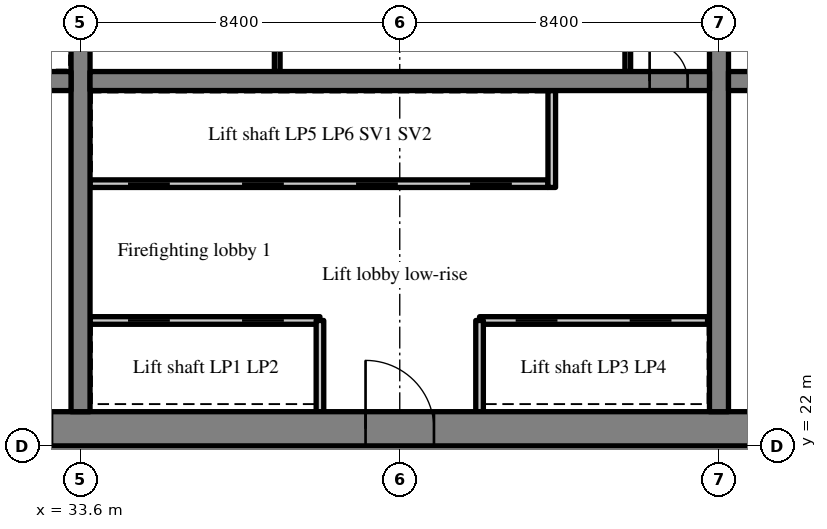
"""IFC4 building model, lengths in metres.
Left out: names, types, materials, properties, quantities, classifications, styles, units other than length and angle.
Written with IfcOpenShell. Run it as: python <this file> out.ifc"""

import sys

from ifc_helpers import new_model, si_unit, direction, frame, frame_2d, origin, place, context, subcontext, project, spatial, rectangle, extrude, source, transform, mapped, element, fill, save


model = new_model("IFC4")
c1 = context("Model", 3, precision=1e-05, world=origin(), true_north=direction((0.0, 1.0)))
c2 = subcontext(c1, "Body", "Model", "MODEL_VIEW")
j1 = project(units=[si_unit("LENGTHUNIT", "METRE"), si_unit("PLANEANGLEUNIT", "RADIAN")], contexts=[c1])
p1 = place(None, origin())
s1 = spatial("IfcSite", under=j1, at=p1, CompositionType="ELEMENT")
p2 = place(p1, origin())
s2 = spatial("IfcBuilding", under=s1, at=p2, CompositionType="ELEMENT")
p3 = place(p2, frame((0.0, 0.0, 86.4)))
s3 = spatial("IfcBuildingStorey", under=s2, at=p3, CompositionType="ELEMENT", Elevation=86.4)
m1 = source(origin(), c2, "Body", "SweptSolid", [
    extrude(rectangle(XDim=50.4, YDim=0.9, at=frame_2d((25.2, 0.0))), origin(), (0.0, 0.0, 1.0), 4.72),
])
p4 = place(p3, frame((25.2, 22.45, 0.0), z_axis=(0.0, 0.0, 1.0), x_axis=(1.0, 0.0, 0.0)))
e1 = element("IfcWall", 1, at=p4, inside=s3, PredefinedType="SHEAR", context=c2, shape_type="MappedRepresentation", body=[
    mapped(m1, transform((0.0, 0.0, 0.0), scale=1.0)),
])
m2 = source(origin(), c2, "Body", "SweptSolid", [
    extrude(rectangle(XDim=1.8, YDim=2.1, at=frame_2d((0.9, 1.05))), frame((0.0, 0.46, 0.0), z_axis=(0.0, -1.0, 0.0), x_axis=(1.0, 0.0, 0.0)), (0.0, 0.0, 1.0), 0.92),
])
p5 = place(p4, frame((15.9, 0.0, 0.0)))
e2 = element("IfcOpeningElement", 2, at=p5, cuts=e1, PredefinedType="OPENING", context=c2, shape_type="MappedRepresentation", body=[
    mapped(m2, transform((0.0, 0.0, 0.0), scale=1.0)),
])
m3 = source(origin(), c2, "Body", "SweptSolid", [
    extrude(rectangle(XDim=1.2, YDim=2.1, at=frame_2d((0.6, 1.05))), frame((0.0, 0.46, 0.0), z_axis=(0.0, -1.0, 0.0), x_axis=(1.0, 0.0, 0.0)), (0.0, 0.0, 1.0), 0.92),
])
p6 = place(p4, frame((26.975, 0.0, 0.0)))
e3 = element("IfcOpeningElement", 3, at=p6, cuts=e1, PredefinedType="OPENING", context=c2, shape_type="MappedRepresentation", body=[
    mapped(m3, transform((0.0, 0.0, 0.0), scale=1.0)),
])
m4 = source(origin(), c2, "Body", "SweptSolid", [
    extrude(rectangle(XDim=0.9, YDim=2.1, at=frame_2d((0.45, 1.05))), frame((0.0, 0.46, 0.0), z_axis=(0.0, -1.0, 0.0), x_axis=(1.0, 0.0, 0.0)), (0.0, 0.0, 1.0), 0.92),
])
p7 = place(p4, frame((34.5, 0.0, 0.0)))
e4 = element("IfcOpeningElement", 4, at=p7, cuts=e1, PredefinedType="OPENING", context=c2, shape_type="MappedRepresentation", body=[
    mapped(m4, transform((0.0, 0.0, 0.0), scale=1.0)),
])
p8 = place(p4, frame((31.5, 0.0, 0.0)))
e5 = element("IfcOpeningElement", 5, at=p8, cuts=e1, PredefinedType="OPENING", context=c2, shape_type="MappedRepresentation", body=[
    mapped(m4, transform((0.0, 0.0, 0.0), scale=1.0)),
])
p9 = place(p4, frame((39.788, 0.0, 0.0)))
e6 = element("IfcOpeningElement", 6, at=p9, cuts=e1, PredefinedType="OPENING", context=c2, shape_type="MappedRepresentation", body=[
    mapped(m4, transform((0.0, 0.0, 0.0), scale=1.0)),
])
p10 = place(p4, frame((36.762, 0.0, 0.0)))
e7 = element("IfcOpeningElement", 7, at=p10, cuts=e1, PredefinedType="OPENING", context=c2, shape_type="MappedRepresentation", body=[
    mapped(m4, transform((0.0, 0.0, 0.0), scale=1.0)),
])
p11 = place(p4, frame((6.45, 0.0, 0.0)))
e8 = element("IfcOpeningElement", 8, at=p11, cuts=e1, PredefinedType="OPENING", context=c2, shape_type="MappedRepresentation", body=[
    mapped(m3, transform((0.0, 0.0, 0.0), scale=1.0)),
])
p12 = place(p4, frame((47.775, 0.0, 0.0)))
e9 = element("IfcOpeningElement", 9, at=p12, cuts=e1, PredefinedType="OPENING", context=c2, shape_type="MappedRepresentation", body=[
    mapped(m3, transform((0.0, 0.0, 0.0), scale=1.0)),
])
m5 = source(origin(), c2, "Body", "SweptSolid", [
    extrude(rectangle(XDim=18.2, YDim=0.5, at=frame_2d((9.1, 0.0))), origin(), (0.0, 0.0, 1.0), 4.72),
])
p13 = place(p3, frame((33.6, 22.9, 0.0), z_axis=(0.0, 0.0, 1.0), x_axis=(0.0, 1.0, 0.0)))
e10 = element("IfcWall", 10, at=p13, inside=s3, PredefinedType="SHEAR", context=c2, shape_type="MappedRepresentation", body=[
    mapped(m5, transform((0.0, 0.0, 0.0), scale=1.0)),
])
m6 = source(origin(), c2, "Body", "SweptSolid", [
    extrude(rectangle(XDim=1.1, YDim=2.1, at=frame_2d((0.55, 1.05))), frame((0.0, 0.26, 0.0), z_axis=(0.0, -1.0, 0.0), x_axis=(1.0, 0.0, 0.0)), (0.0, 0.0, 1.0), 0.52),
])
p14 = place(p13, frame((12.55, 0.0, 0.0)))
e11 = element("IfcOpeningElement", 11, at=p14, cuts=e10, PredefinedType="OPENING", context=c2, shape_type="MappedRepresentation", body=[
    mapped(m6, transform((0.0, 0.0, 0.0), scale=1.0)),
])
p15 = place(p3, frame((50.4, 22.9, 0.0), z_axis=(0.0, 0.0, 1.0), x_axis=(0.0, 1.0, 0.0)))
e12 = element("IfcWall", 12, at=p15, inside=s3, PredefinedType="SHEAR", context=c2, shape_type="MappedRepresentation", body=[
    mapped(m5, transform((0.0, 0.0, 0.0), scale=1.0)),
])
p16 = place(p15, frame((12.55, 0.0, 0.0)))
e13 = element("IfcOpeningElement", 13, at=p16, cuts=e12, PredefinedType="OPENING", context=c2, shape_type="MappedRepresentation", body=[
    mapped(m6, transform((0.0, 0.0, 0.0), scale=1.0)),
])
m7 = source(origin(), c2, "Body", "SweptSolid", [
    extrude(rectangle(XDim=7.25, YDim=0.5, at=frame_2d((3.625, 0.0))), origin(), (0.0, 0.0, 1.0), 4.72),
])
p17 = place(p3, frame((26.1, 31.6, 0.0), z_axis=(0.0, 0.0, 1.0), x_axis=(1.0, 0.0, 0.0)))
e14 = element("IfcWall", 14, at=p17, inside=s3, PredefinedType="SHEAR", context=c2, shape_type="MappedRepresentation", body=[
    mapped(m7, transform((0.0, 0.0, 0.0), scale=1.0)),
])
p18 = place(p17, frame((5.6, 0.0, 0.0)))
e15 = element("IfcOpeningElement", 15, at=p18, cuts=e14, PredefinedType="OPENING", context=c2, shape_type="MappedRepresentation", body=[
    mapped(m6, transform((0.0, 0.0, 0.0), scale=1.0)),
])
m8 = source(origin(), c2, "Body", "SweptSolid", [
    extrude(rectangle(XDim=16.3, YDim=0.5, at=frame_2d((8.15, 0.0))), origin(), (0.0, 0.0, 1.0), 4.72),
])
p19 = place(p3, frame((33.85, 31.6, 0.0), z_axis=(0.0, 0.0, 1.0), x_axis=(1.0, 0.0, 0.0)))
e16 = element("IfcWall", 16, at=p19, inside=s3, PredefinedType="SHEAR", context=c2, shape_type="MappedRepresentation", body=[
    mapped(m8, transform((0.0, 0.0, 0.0), scale=1.0)),
])
m9 = source(origin(), c2, "Body", "SweptSolid", [
    extrude(rectangle(XDim=1.0, YDim=2.1, at=frame_2d((0.5, 1.05))), frame((0.0, 0.26, 0.0), z_axis=(0.0, -1.0, 0.0), x_axis=(1.0, 0.0, 0.0)), (0.0, 0.0, 1.0), 0.52),
])
p20 = place(p19, frame((14.725, 0.0, 0.0)))
e17 = element("IfcOpeningElement", 17, at=p20, cuts=e16, PredefinedType="OPENING", context=c2, shape_type="MappedRepresentation", body=[
    mapped(m9, transform((0.0, 0.0, 0.0), scale=1.0)),
])
m10 = source(origin(), c2, "Body", "SweptSolid", [
    extrude(rectangle(XDim=16.3, YDim=0.5, at=frame_2d((8.15, 0.0))), origin(), (0.0, 0.0, 1.0), 4.72),
])
p21 = place(p3, frame((50.65, 31.6, 0.0), z_axis=(0.0, 0.0, 1.0), x_axis=(1.0, 0.0, 0.0)))
e18 = element("IfcWall", 18, at=p21, inside=s3, PredefinedType="SHEAR", context=c2, shape_type="MappedRepresentation", body=[
    mapped(m10, transform((0.0, 0.0, 0.0), scale=1.0)),
])
p22 = place(p21, frame((0.575, 0.0, 0.0)))
e19 = element("IfcOpeningElement", 19, at=p22, cuts=e18, PredefinedType="OPENING", context=c2, shape_type="MappedRepresentation", body=[
    mapped(m9, transform((0.0, 0.0, 0.0), scale=1.0)),
])
m11 = source(origin(), c2, "Body", "SweptSolid", [
    extrude(rectangle(XDim=6.05, YDim=0.2, at=frame_2d((3.025, 0.0))), origin(), (0.0, 0.0, 1.0), 4.72),
])
p23 = place(p3, frame((33.85, 25.3, 0.0), z_axis=(0.0, 0.0, 1.0), x_axis=(1.0, 0.0, 0.0)))
e20 = element("IfcWall", 20, at=p23, inside=s3, PredefinedType="SOLIDWALL", context=c2, shape_type="MappedRepresentation", body=[
    mapped(m11, transform((0.0, 0.0, 0.0), scale=1.0)),
])
m12 = source(origin(), c2, "Body", "SweptSolid", [
    extrude(rectangle(XDim=1.1, YDim=2.1, at=frame_2d((0.55, 1.05))), frame((0.0, 0.11, 0.0), z_axis=(0.0, -1.0, 0.0), x_axis=(1.0, 0.0, 0.0)), (0.0, 0.0, 1.0), 0.22),
])
p24 = place(p23, frame((1.0, 0.0, 0.0)))
e21 = element("IfcOpeningElement", 21, at=p24, cuts=e20, PredefinedType="OPENING", context=c2, shape_type="MappedRepresentation", body=[
    mapped(m12, transform((0.0, 0.0, 0.0), scale=1.0)),
])
p25 = place(p23, frame((4.0, 0.0, 0.0)))
e22 = element("IfcOpeningElement", 22, at=p25, cuts=e20, PredefinedType="OPENING", context=c2, shape_type="MappedRepresentation", body=[
    mapped(m12, transform((0.0, 0.0, 0.0), scale=1.0)),
])
m13 = source(origin(), c2, "Body", "SweptSolid", [
    extrude(rectangle(XDim=6.0, YDim=0.2, at=frame_2d((3.0, 0.0))), origin(), (0.0, 0.0, 1.0), 4.72),
])
p26 = place(p3, frame((44.1, 25.3, 0.0), z_axis=(0.0, 0.0, 1.0), x_axis=(1.0, 0.0, 0.0)))
e23 = element("IfcWall", 23, at=p26, inside=s3, PredefinedType="SOLIDWALL", context=c2, shape_type="MappedRepresentation", body=[
    mapped(m13, transform((0.0, 0.0, 0.0), scale=1.0)),
])
p27 = place(p26, frame((0.95, 0.0, 0.0)))
e24 = element("IfcOpeningElement", 24, at=p27, cuts=e23, PredefinedType="OPENING", context=c2, shape_type="MappedRepresentation", body=[
    mapped(m12, transform((0.0, 0.0, 0.0), scale=1.0)),
])
p28 = place(p26, frame((3.95, 0.0, 0.0)))
e25 = element("IfcOpeningElement", 25, at=p28, cuts=e23, PredefinedType="OPENING", context=c2, shape_type="MappedRepresentation", body=[
    mapped(m12, transform((0.0, 0.0, 0.0), scale=1.0)),
])
m14 = source(origin(), c2, "Body", "SweptSolid", [
    extrude(rectangle(XDim=12.05, YDim=0.2, at=frame_2d((6.025, 0.0))), origin(), (0.0, 0.0, 1.0), 4.72),
])
p29 = place(p3, frame((33.85, 28.9, 0.0), z_axis=(0.0, 0.0, 1.0), x_axis=(1.0, 0.0, 0.0)))
e26 = element("IfcWall", 26, at=p29, inside=s3, PredefinedType="SOLIDWALL", context=c2, shape_type="MappedRepresentation", body=[
    mapped(m14, transform((0.0, 0.0, 0.0), scale=1.0)),
])
p30 = place(p29, frame((1.0, 0.0, 0.0)))
e27 = element("IfcOpeningElement", 27, at=p30, cuts=e26, PredefinedType="OPENING", context=c2, shape_type="MappedRepresentation", body=[
    mapped(m12, transform((0.0, 0.0, 0.0), scale=1.0)),
])
p31 = place(p29, frame((4.0, 0.0, 0.0)))
e28 = element("IfcOpeningElement", 28, at=p31, cuts=e26, PredefinedType="OPENING", context=c2, shape_type="MappedRepresentation", body=[
    mapped(m12, transform((0.0, 0.0, 0.0), scale=1.0)),
])
p32 = place(p29, frame((7.0, 0.0, 0.0)))
e29 = element("IfcOpeningElement", 29, at=p32, cuts=e26, PredefinedType="OPENING", context=c2, shape_type="MappedRepresentation", body=[
    mapped(m12, transform((0.0, 0.0, 0.0), scale=1.0)),
])
p33 = place(p29, frame((10.0, 0.0, 0.0)))
e30 = element("IfcOpeningElement", 30, at=p33, cuts=e26, PredefinedType="OPENING", context=c2, shape_type="MappedRepresentation", body=[
    mapped(m12, transform((0.0, 0.0, 0.0), scale=1.0)),
])
m15 = source(origin(), c2, "Body", "SweptSolid", [
    extrude(rectangle(XDim=2.4, YDim=0.2, at=frame_2d((1.2, 0.0))), origin(), (0.0, 0.0, 1.0), 4.72),
])
for number, where, z_axis, x_axis in (
    (31, (39.9, 22.9, 0.0), (0.0, 0.0, 1.0), (0.0, 1.0, 0.0)),
    (32, (44.1, 22.9, 0.0), (0.0, 0.0, 1.0), (0.0, 1.0, 0.0)),
):
    element("IfcWall", number, at=place(p3, frame(where, z_axis=z_axis, x_axis=x_axis)), inside=s3, PredefinedType="SOLIDWALL", context=c2, shape_type="MappedRepresentation", body=[
        mapped(m15, transform((0.0, 0.0, 0.0), scale=1.0)),
    ])
m16 = source(origin(), c2, "Body", "SweptSolid", [
    extrude(rectangle(XDim=2.55, YDim=0.2, at=frame_2d((1.275, 0.0))), origin(), (0.0, 0.0, 1.0), 4.72),
])
p34 = place(p3, frame((46.0, 28.8, 0.0), z_axis=(0.0, 0.0, 1.0), x_axis=(0.0, 1.0, 0.0)))
e33 = element("IfcWall", 33, at=p34, inside=s3, PredefinedType="SOLIDWALL", context=c2, shape_type="MappedRepresentation", body=[
    mapped(m16, transform((0.0, 0.0, 0.0), scale=1.0)),
])
m17 = source(origin(), c2, "Body", "SweptSolid", [
    extrude(rectangle(XDim=3.15, YDim=0.15, at=frame_2d((1.575, 0.0))), origin(), (0.0, 0.0, 1.0), 4.72),
])
for number, where, z_axis, x_axis in (
    (34, (48.0, 31.85, 0.0), (0.0, 0.0, 1.0), (0.0, 1.0, 0.0)),
    (35, (38.776, 31.85, 0.0), (0.0, 0.0, 1.0), (0.0, 1.0, 0.0)),
):
    element("IfcWall", number, at=place(p3, frame(where, z_axis=z_axis, x_axis=x_axis)), inside=s3, PredefinedType="PARTITIONING", context=c2, shape_type="MappedRepresentation", body=[
        mapped(m17, transform((0.0, 0.0, 0.0), scale=1.0)),
    ])
m18 = source(origin(), c2, "Body", "SweptSolid", [
    extrude(rectangle(XDim=1.8, YDim=2.1, at=frame_2d((0.9, 1.05))), frame((0.0, 0.375, 0.0), z_axis=(0.0, -1.0, 0.0), x_axis=(1.0, 0.0, 0.0)), (0.0, 0.0, 1.0), 0.05),
])
p35 = place(p5, origin())
e36 = element("IfcDoor", 36, at=p35, inside=s3, OperationType="DOUBLE_DOOR_SINGLE_SWING", PredefinedType="DOOR", context=c2, shape_type="MappedRepresentation", body=[
    mapped(m18, transform((0.0, 0.0, 0.0), scale=1.0)),
])
fill(e2, e36)
m19 = source(origin(), c2, "Body", "SweptSolid", [
    extrude(rectangle(XDim=1.0, YDim=2.1, at=frame_2d((0.5, 1.05))), frame((0.0, 0.025, 0.0), z_axis=(0.0, -1.0, 0.0), x_axis=(1.0, 0.0, 0.0)), (0.0, 0.0, 1.0), 0.05),
])
p36 = place(p20, origin())
e37 = element("IfcDoor", 37, at=p36, inside=s3, OperationType="SINGLE_SWING_LEFT", PredefinedType="DOOR", context=c2, shape_type="MappedRepresentation", body=[
    mapped(m19, transform((0.0, 0.0, 0.0), scale=1.0)),
])
fill(e17, e37)
m20 = source(origin(), c2, "Body", "SweptSolid", [
    extrude(rectangle(XDim=1.1, YDim=2.1, at=frame_2d((0.55, 1.05))), frame((0.0, 0.025, 0.0), z_axis=(0.0, -1.0, 0.0), x_axis=(1.0, 0.0, 0.0)), (0.0, 0.0, 1.0), 0.05),
])
p37 = place(p24, origin())
e38 = element("IfcDoor", 38, at=p37, inside=s3, OperationType="SLIDING_TO_LEFT", PredefinedType="DOOR", context=c2, shape_type="MappedRepresentation", body=[
    mapped(m20, transform((0.0, 0.0, 0.0), scale=1.0)),
])
fill(e21, e38)
p38 = place(p25, origin())
e39 = element("IfcDoor", 39, at=p38, inside=s3, OperationType="SLIDING_TO_RIGHT", PredefinedType="DOOR", context=c2, shape_type="MappedRepresentation", body=[
    mapped(m20, transform((0.0, 0.0, 0.0), scale=1.0)),
])
fill(e22, e39)
p39 = place(p27, origin())
e40 = element("IfcDoor", 40, at=p39, inside=s3, OperationType="SLIDING_TO_LEFT", PredefinedType="DOOR", context=c2, shape_type="MappedRepresentation", body=[
    mapped(m20, transform((0.0, 0.0, 0.0), scale=1.0)),
])
fill(e24, e40)
p40 = place(p28, origin())
e41 = element("IfcDoor", 41, at=p40, inside=s3, OperationType="SLIDING_TO_RIGHT", PredefinedType="DOOR", context=c2, shape_type="MappedRepresentation", body=[
    mapped(m20, transform((0.0, 0.0, 0.0), scale=1.0)),
])
fill(e25, e41)
p41 = place(p30, origin())
e42 = element("IfcDoor", 42, at=p41, inside=s3, OperationType="SLIDING_TO_LEFT", PredefinedType="DOOR", context=c2, shape_type="MappedRepresentation", body=[
    mapped(m20, transform((0.0, 0.0, 0.0), scale=1.0)),
])
fill(e27, e42)
p42 = place(p31, origin())
e43 = element("IfcDoor", 43, at=p42, inside=s3, OperationType="SLIDING_TO_RIGHT", PredefinedType="DOOR", context=c2, shape_type="MappedRepresentation", body=[
    mapped(m20, transform((0.0, 0.0, 0.0), scale=1.0)),
])
fill(e28, e43)
p43 = place(p32, origin())
e44 = element("IfcDoor", 44, at=p43, inside=s3, OperationType="SLIDING_TO_LEFT", PredefinedType="DOOR", context=c2, shape_type="MappedRepresentation", body=[
    mapped(m20, transform((0.0, 0.0, 0.0), scale=1.0)),
])
fill(e29, e44)
p44 = place(p33, origin())
e45 = element("IfcDoor", 45, at=p44, inside=s3, OperationType="SLIDING_TO_RIGHT", PredefinedType="DOOR", context=c2, shape_type="MappedRepresentation", body=[
    mapped(m20, transform((0.0, 0.0, 0.0), scale=1.0)),
])
fill(e30, e45)
save(model, sys.argv[1])
